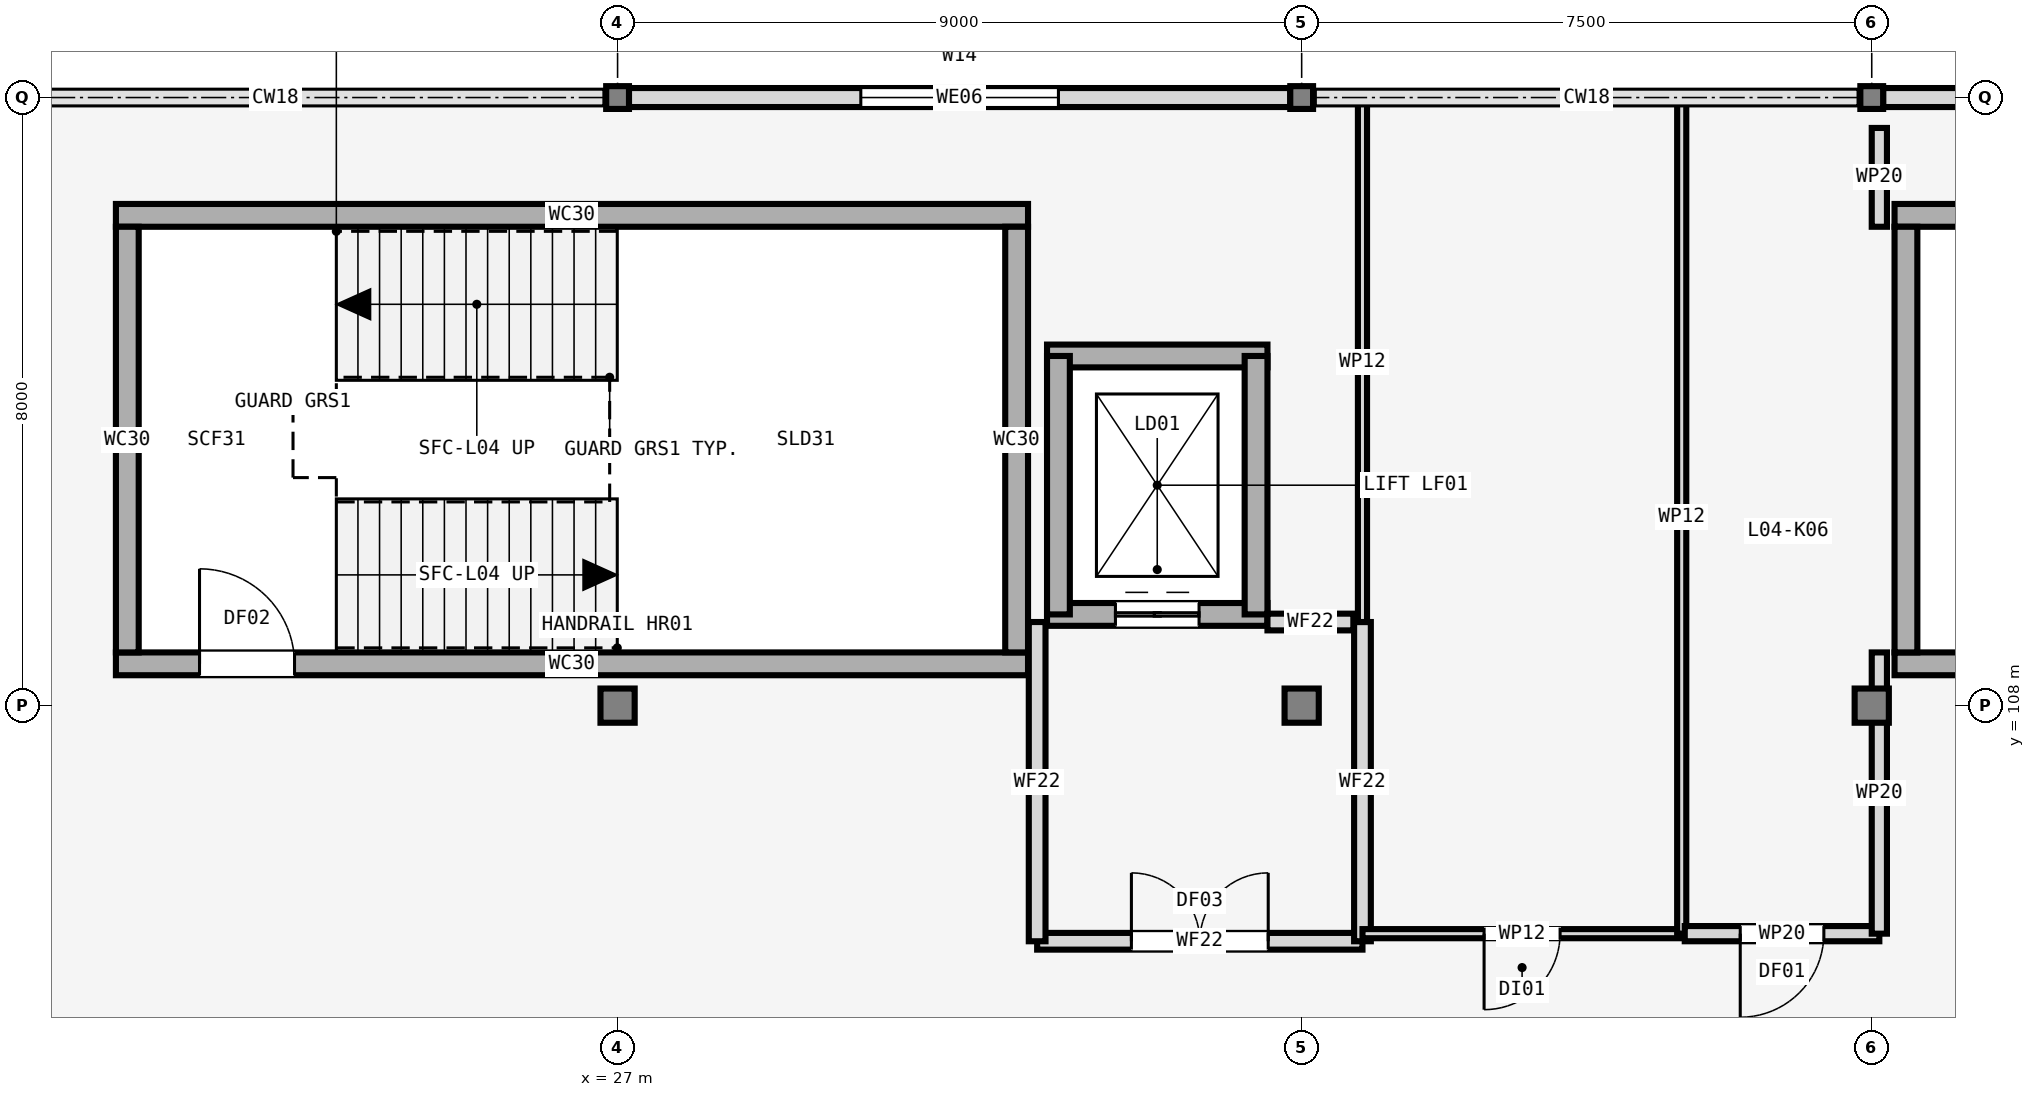
"""IFC4 building model, lengths in metres.
Left out: names, types, materials, properties, quantities, classifications, styles, units other than length and angle.
Written with IfcOpenShell. Run it as: python <this file> out.ifc"""

import sys

from ifc_helpers import new_model, si_unit, direction, frame, frame_2d, origin, origin_2d, place, context, subcontext, project, spatial, rectangle, i_section, extrude, element, fill, save


model = new_model("IFC4")
c1 = context("Model", 3, precision=1e-05, world=origin(), true_north=direction((0.0, 1.0)))
c2 = subcontext(c1, "Body", "Model", "MODEL_VIEW")
j1 = project(units=[si_unit("LENGTHUNIT", "METRE"), si_unit("PLANEANGLEUNIT", "RADIAN")], contexts=[c1])
p1 = place(None, origin())
s1 = spatial("IfcSite", under=j1, at=p1, CompositionType="ELEMENT")
p2 = place(p1, origin())
s2 = spatial("IfcBuilding", under=s1, at=p2, CompositionType="ELEMENT")
p3 = place(p2, frame((0.0, 0.0, 17.7)))
s3 = spatial("IfcBuildingStorey", under=s2, at=p3, CompositionType="ELEMENT", Elevation=17.7)
p4 = place(p3, frame((27.0, 108.0, 0.0), z_axis=(0.0, 0.0, 1.0), x_axis=(1.0, 0.0, 0.0)))
e1 = element("IfcColumn", 1, at=p4, inside=s3, PredefinedType="COLUMN", context=c2, shape_type="SweptSolid", body=[
    extrude(rectangle(XDim=0.45, YDim=0.45, at=origin_2d()), origin(), (0.0, 0.0, 1.0), 3.96),
])
p5 = place(p3, frame((27.0, 116.0, 0.0), z_axis=(0.0, 0.0, 1.0), x_axis=(1.0, 0.0, 0.0)))
e2 = element("IfcColumn", 2, at=p5, inside=s3, PredefinedType="COLUMN", context=c2, shape_type="SweptSolid", body=[
    extrude(i_section(OverallWidth=0.3, OverallDepth=0.3, WebThickness=0.011, FlangeThickness=0.019, at=origin_2d()), origin(), (0.0, 0.0, 1.0), 3.96),
])
p6 = place(p3, frame((36.0, 108.0, 0.0), z_axis=(0.0, 0.0, 1.0), x_axis=(1.0, 0.0, 0.0)))
e3 = element("IfcColumn", 3, at=p6, inside=s3, PredefinedType="COLUMN", context=c2, shape_type="SweptSolid", body=[
    extrude(rectangle(XDim=0.45, YDim=0.45, at=origin_2d()), origin(), (0.0, 0.0, 1.0), 3.96),
])
p7 = place(p3, frame((36.0, 116.0, 0.0), z_axis=(0.0, 0.0, 1.0), x_axis=(1.0, 0.0, 0.0)))
e4 = element("IfcColumn", 4, at=p7, inside=s3, PredefinedType="COLUMN", context=c2, shape_type="SweptSolid", body=[
    extrude(i_section(OverallWidth=0.3, OverallDepth=0.3, WebThickness=0.011, FlangeThickness=0.019, at=origin_2d()), origin(), (0.0, 0.0, 1.0), 3.96),
])
p8 = place(p3, frame((43.5, 108.0, 0.0), z_axis=(0.0, 0.0, 1.0), x_axis=(1.0, 0.0, 0.0)))
e5 = element("IfcColumn", 5, at=p8, inside=s3, PredefinedType="COLUMN", context=c2, shape_type="SweptSolid", body=[
    extrude(rectangle(XDim=0.45, YDim=0.45, at=origin_2d()), origin(), (0.0, 0.0, 1.0), 3.96),
])
p9 = place(p3, frame((43.5, 116.0, 0.0), z_axis=(0.0, 0.0, 1.0), x_axis=(1.0, 0.0, 0.0)))
e6 = element("IfcColumn", 6, at=p9, inside=s3, PredefinedType="COLUMN", context=c2, shape_type="SweptSolid", body=[
    extrude(i_section(OverallWidth=0.3, OverallDepth=0.3, WebThickness=0.011, FlangeThickness=0.019, at=origin_2d()), origin(), (0.0, 0.0, 1.0), 3.96),
])
p10 = place(p3, frame((35.85, 116.0, 0.0), z_axis=(0.0, 0.0, 1.0), x_axis=(-1.0, 0.0, 0.0)))
e7 = element("IfcWall", 7, at=p10, inside=s3, PredefinedType="SOLIDWALL", context=c2, shape_type="SweptSolid", body=[
    extrude(rectangle(XDim=8.7, YDim=0.25, at=frame_2d((4.35, 0.0))), origin(), (0.0, 0.0, 1.0), 3.67),
])
p11 = place(p10, frame((3.05, 0.0, 0.95)))
e8 = element("IfcOpeningElement", 8, at=p11, cuts=e7, PredefinedType="OPENING", context=c2, shape_type="SweptSolid", body=[
    extrude(rectangle(XDim=2.6, YDim=1.75, at=frame_2d((1.3, 0.875))), frame((0.0, 0.135, 0.0), z_axis=(0.0, -1.0, 0.0), x_axis=(1.0, 0.0, 0.0)), (0.0, 0.0, 1.0), 0.27),
])
p12 = place(p3, frame((50.85, 116.0, 0.0), z_axis=(0.0, 0.0, 1.0), x_axis=(-1.0, 0.0, 0.0)))
e9 = element("IfcWall", 9, at=p12, inside=s3, PredefinedType="SOLIDWALL", context=c2, shape_type="SweptSolid", body=[
    extrude(rectangle(XDim=7.2, YDim=0.25, at=frame_2d((3.6, 0.0))), origin(), (0.0, 0.0, 1.0), 3.67),
])
p13 = place(p12, frame((2.625, 0.0, 0.95)))
e10 = element("IfcOpeningElement", 10, at=p13, cuts=e9, PredefinedType="OPENING", context=c2, shape_type="SweptSolid", body=[
    extrude(rectangle(XDim=1.95, YDim=1.65, at=frame_2d((0.975, 0.825))), frame((0.0, 0.135, 0.0), z_axis=(0.0, -1.0, 0.0), x_axis=(1.0, 0.0, 0.0)), (0.0, 0.0, 1.0), 0.27),
])
p14 = place(p3, frame((20.4, 108.55, 0.0), z_axis=(0.0, 0.0, 1.0), x_axis=(1.0, 0.0, 0.0)))
e11 = element("IfcWall", 11, at=p14, inside=s3, PredefinedType="SHEAR", context=c2, shape_type="SweptSolid", body=[
    extrude(rectangle(XDim=12.0, YDim=0.3, at=frame_2d((6.0, 0.0))), origin(), (0.0, 0.0, 1.0), 4.2),
])
p15 = place(p14, frame((1.1, 0.0, 0.0)))
e12 = element("IfcOpeningElement", 12, at=p15, cuts=e11, PredefinedType="OPENING", context=c2, shape_type="SweptSolid", body=[
    extrude(rectangle(XDim=1.25, YDim=2.15, at=frame_2d((0.625, 1.075))), frame((0.0, 0.16, 0.0), z_axis=(0.0, -1.0, 0.0), x_axis=(1.0, 0.0, 0.0)), (0.0, 0.0, 1.0), 0.32),
])
p16 = place(p3, frame((32.4, 114.45, 0.0), z_axis=(0.0, 0.0, 1.0), x_axis=(-1.0, 0.0, 0.0)))
e13 = element("IfcWall", 13, at=p16, inside=s3, PredefinedType="SHEAR", context=c2, shape_type="SweptSolid", body=[
    extrude(rectangle(XDim=12.0, YDim=0.3, at=frame_2d((6.0, 0.0))), origin(), (0.0, 0.0, 1.0), 4.2),
])
for number, where, z_axis, x_axis in (
    (14, (20.55, 114.3, 0.0), (0.0, 0.0, 1.0), (0.0, -1.0, 0.0)),
    (15, (32.25, 108.7, 0.0), (0.0, 0.0, 1.0), (0.0, 1.0, 0.0)),
):
    element("IfcWall", number, at=place(p3, frame(where, z_axis=z_axis, x_axis=x_axis)), inside=s3, PredefinedType="SHEAR", context=c2, shape_type="SweptSolid", body=[
        extrude(rectangle(XDim=5.6, YDim=0.3, at=frame_2d((2.8, 0.0))), origin(), (0.0, 0.0, 1.0), 4.2),
    ])
p17 = place(p3, frame((43.8, 108.55, 0.0), z_axis=(0.0, 0.0, 1.0), x_axis=(1.0, 0.0, 0.0)))
e16 = element("IfcWall", 16, at=p17, inside=s3, PredefinedType="SHEAR", context=c2, shape_type="SweptSolid", body=[
    extrude(rectangle(XDim=12.0, YDim=0.3, at=frame_2d((6.0, 0.0))), origin(), (0.0, 0.0, 1.0), 4.2),
])
p18 = place(p17, frame((1.1, 0.0, 0.0)))
e17 = element("IfcOpeningElement", 17, at=p18, cuts=e16, PredefinedType="OPENING", context=c2, shape_type="SweptSolid", body=[
    extrude(rectangle(XDim=1.25, YDim=2.15, at=frame_2d((0.625, 1.075))), frame((0.0, 0.16, 0.0), z_axis=(0.0, -1.0, 0.0), x_axis=(1.0, 0.0, 0.0)), (0.0, 0.0, 1.0), 0.32),
])
p19 = place(p3, frame((55.8, 114.45, 0.0), z_axis=(0.0, 0.0, 1.0), x_axis=(-1.0, 0.0, 0.0)))
e18 = element("IfcWall", 18, at=p19, inside=s3, PredefinedType="SHEAR", context=c2, shape_type="SweptSolid", body=[
    extrude(rectangle(XDim=12.0, YDim=0.3, at=frame_2d((6.0, 0.0))), origin(), (0.0, 0.0, 1.0), 4.2),
])
p20 = place(p3, frame((43.95, 114.3, 0.0), z_axis=(0.0, 0.0, 1.0), x_axis=(0.0, -1.0, 0.0)))
e19 = element("IfcWall", 19, at=p20, inside=s3, PredefinedType="SHEAR", context=c2, shape_type="SweptSolid", body=[
    extrude(rectangle(XDim=5.6, YDim=0.3, at=frame_2d((2.8, 0.0))), origin(), (0.0, 0.0, 1.0), 4.2),
])
p21 = place(p3, frame((32.65, 109.2, 0.0), z_axis=(0.0, 0.0, 1.0), x_axis=(1.0, 0.0, 0.0)))
e20 = element("IfcWall", 20, at=p21, inside=s3, PredefinedType="SHEAR", context=c2, shape_type="SweptSolid", body=[
    extrude(rectangle(XDim=2.9, YDim=0.3, at=frame_2d((1.45, 0.0))), origin(), (0.0, 0.0, 1.0), 4.2),
])
p22 = place(p21, frame((0.9, 0.0, 0.0)))
e21 = element("IfcOpeningElement", 21, at=p22, cuts=e20, PredefinedType="OPENING", context=c2, shape_type="SweptSolid", body=[
    extrude(rectangle(XDim=1.1, YDim=2.15, at=frame_2d((0.55, 1.075))), frame((0.0, 0.16, 0.0), z_axis=(0.0, -1.0, 0.0), x_axis=(1.0, 0.0, 0.0)), (0.0, 0.0, 1.0), 0.32),
])
p23 = place(p3, frame((35.55, 112.6, 0.0), z_axis=(0.0, 0.0, 1.0), x_axis=(-1.0, 0.0, 0.0)))
e22 = element("IfcWall", 22, at=p23, inside=s3, PredefinedType="SHEAR", context=c2, shape_type="SweptSolid", body=[
    extrude(rectangle(XDim=2.9, YDim=0.3, at=frame_2d((1.45, 0.0))), origin(), (0.0, 0.0, 1.0), 4.2),
])
for number, where, z_axis, x_axis in (
    (23, (32.8, 112.6, 0.0), (0.0, 0.0, 1.0), (0.0, -1.0, 0.0)),
    (24, (35.4, 109.2, 0.0), (0.0, 0.0, 1.0), (0.0, 1.0, 0.0)),
):
    element("IfcWall", number, at=place(p3, frame(where, z_axis=z_axis, x_axis=x_axis)), inside=s3, PredefinedType="SHEAR", context=c2, shape_type="SweptSolid", body=[
        extrude(rectangle(XDim=3.4, YDim=0.3, at=frame_2d((1.7, 0.0))), origin(), (0.0, 0.0, 1.0), 4.2),
    ])
p24 = place(p3, frame((32.52, 104.9, 0.0), z_axis=(0.0, 0.0, 1.0), x_axis=(1.0, 0.0, 0.0)))
e25 = element("IfcWall", 25, at=p24, inside=s3, PredefinedType="SOLIDWALL", context=c2, shape_type="SweptSolid", body=[
    extrude(rectangle(XDim=4.28, YDim=0.22, at=frame_2d((2.14, 0.0))), origin(), (0.0, 0.0, 1.0), 3.15),
])
p25 = place(p24, frame((1.24, 0.0, 0.0)))
e26 = element("IfcOpeningElement", 26, at=p25, cuts=e25, PredefinedType="OPENING", context=c2, shape_type="SweptSolid", body=[
    extrude(rectangle(XDim=1.8, YDim=2.2, at=frame_2d((0.9, 1.1))), frame((0.0, 0.12, 0.0), z_axis=(0.0, -1.0, 0.0), x_axis=(1.0, 0.0, 0.0)), (0.0, 0.0, 1.0), 0.24),
])
for number, where, z_axis, x_axis in (
    (27, (32.52, 104.9, 0.0), (0.0, 0.0, 1.0), (0.0, 1.0, 0.0)),
    (28, (36.8, 104.9, 0.0), (0.0, 0.0, 1.0), (0.0, 1.0, 0.0)),
):
    element("IfcWall", number, at=place(p3, frame(where, z_axis=z_axis, x_axis=x_axis)), inside=s3, PredefinedType="SOLIDWALL", context=c2, shape_type="SweptSolid", body=[
        extrude(rectangle(XDim=4.2, YDim=0.22, at=frame_2d((2.1, 0.0))), origin(), (0.0, 0.0, 1.0), 3.15),
    ])
p26 = place(p3, frame((35.55, 109.1, 0.0), z_axis=(0.0, 0.0, 1.0), x_axis=(1.0, 0.0, 0.0)))
e29 = element("IfcWall", 29, at=p26, inside=s3, PredefinedType="SOLIDWALL", context=c2, shape_type="SweptSolid", body=[
    extrude(rectangle(XDim=1.13, YDim=0.22, at=frame_2d((0.565, 0.0))), origin(), (0.0, 0.0, 1.0), 3.15),
])
p27 = place(p3, frame((41.0, 105.0, 0.0), z_axis=(0.0, 0.0, 1.0), x_axis=(-1.0, 0.0, 0.0)))
e30 = element("IfcWall", 30, at=p27, inside=s3, PredefinedType="PARTITIONING", context=c2, shape_type="SweptSolid", body=[
    extrude(rectangle(XDim=4.2, YDim=0.12, at=frame_2d((2.1, 0.0))), origin(), (0.0, 0.0, 1.0), 3.15),
])
p28 = place(p27, frame((1.6, 0.0, 0.0)))
e31 = element("IfcOpeningElement", 31, at=p28, cuts=e30, PredefinedType="OPENING", context=c2, shape_type="SweptSolid", body=[
    extrude(rectangle(XDim=1.0, YDim=2.1, at=frame_2d((0.5, 1.05))), frame((0.0, 0.07, 0.0), z_axis=(0.0, -1.0, 0.0), x_axis=(1.0, 0.0, 0.0)), (0.0, 0.0, 1.0), 0.14),
])
p29 = place(p3, frame((41.0, 115.952, 0.0), z_axis=(0.0, 0.0, 1.0), x_axis=(0.0, -1.0, 0.0)))
e32 = element("IfcWall", 32, at=p29, inside=s3, PredefinedType="PARTITIONING", context=c2, shape_type="SweptSolid", body=[
    extrude(rectangle(XDim=10.952, YDim=0.12, at=frame_2d((5.476, 0.0))), origin(), (0.0, 0.0, 1.0), 3.15),
])
p30 = place(p3, frame((36.8, 109.1, 0.0), z_axis=(0.0, 0.0, 1.0), x_axis=(0.0, 1.0, 0.0)))
e33 = element("IfcWall", 33, at=p30, inside=s3, PredefinedType="PARTITIONING", context=c2, shape_type="SweptSolid", body=[
    extrude(rectangle(XDim=6.852, YDim=0.12, at=frame_2d((3.426, 0.0))), origin(), (0.0, 0.0, 1.0), 3.15),
])
p31 = place(p3, frame((43.6, 105.0, 0.0), z_axis=(0.0, 0.0, 1.0), x_axis=(-1.0, 0.0, 0.0)))
e34 = element("IfcWall", 34, at=p31, inside=s3, PredefinedType="PARTITIONING", context=c2, shape_type="SweptSolid", body=[
    extrude(rectangle(XDim=2.56, YDim=0.2, at=frame_2d((1.28, 0.0))), origin(), (0.0, 0.0, 1.0), 3.15),
])
p32 = place(p31, frame((0.73, 0.0, 0.0)))
e35 = element("IfcOpeningElement", 35, at=p32, cuts=e34, PredefinedType="OPENING", context=c2, shape_type="SweptSolid", body=[
    extrude(rectangle(XDim=1.1, YDim=2.15, at=frame_2d((0.55, 1.075))), frame((0.0, 0.11, 0.0), z_axis=(0.0, -1.0, 0.0), x_axis=(1.0, 0.0, 0.0)), (0.0, 0.0, 1.0), 0.22),
])
p33 = place(p3, frame((43.6, 108.7, 0.0), z_axis=(0.0, 0.0, 1.0), x_axis=(0.0, -1.0, 0.0)))
e36 = element("IfcWall", 36, at=p33, inside=s3, PredefinedType="PARTITIONING", context=c2, shape_type="SweptSolid", body=[
    extrude(rectangle(XDim=3.7, YDim=0.2, at=frame_2d((1.85, 0.0))), origin(), (0.0, 0.0, 1.0), 3.15),
])
p34 = place(p3, frame((43.6, 115.6, 0.0), z_axis=(0.0, 0.0, 1.0), x_axis=(0.0, -1.0, 0.0)))
e37 = element("IfcWall", 37, at=p34, inside=s3, PredefinedType="PARTITIONING", context=c2, shape_type="SweptSolid", body=[
    extrude(rectangle(XDim=1.3, YDim=0.2, at=frame_2d((0.65, 0.0))), origin(), (0.0, 0.0, 1.0), 3.15),
])
p35 = place(p11, origin())
e38 = element("IfcWindow", 38, at=p35, inside=s3, PartitioningType="SINGLE_PANEL", PredefinedType="WINDOW", context=c2, shape_type="SweptSolid", body=[
    extrude(rectangle(XDim=2.6, YDim=1.75, at=frame_2d((1.3, 0.875))), frame((0.0, 0.03, 0.0), z_axis=(0.0, -1.0, 0.0), x_axis=(1.0, 0.0, 0.0)), (0.0, 0.0, 1.0), 0.06),
])
fill(e8, e38)
p36 = place(p15, origin())
e39 = element("IfcDoor", 39, at=p36, inside=s3, OperationType="SINGLE_SWING_LEFT", PredefinedType="DOOR", context=c2, shape_type="SweptSolid", body=[
    extrude(rectangle(XDim=1.25, YDim=2.15, at=frame_2d((0.625, 1.075))), frame((0.0, 0.025, 0.0), z_axis=(0.0, -1.0, 0.0), x_axis=(1.0, 0.0, 0.0)), (0.0, 0.0, 1.0), 0.05),
])
fill(e12, e39)
p37 = place(p22, origin())
e40 = element("IfcDoor", 40, at=p37, inside=s3, OperationType="DOUBLE_DOOR_SLIDING", PredefinedType="DOOR", context=c2, shape_type="SweptSolid", body=[
    extrude(rectangle(XDim=1.1, YDim=2.15, at=frame_2d((0.55, 1.075))), frame((0.0, 0.025, 0.0), z_axis=(0.0, -1.0, 0.0), x_axis=(1.0, 0.0, 0.0)), (0.0, 0.0, 1.0), 0.05),
])
fill(e21, e40)
p38 = place(p25, origin())
e41 = element("IfcDoor", 41, at=p38, inside=s3, OperationType="DOUBLE_DOOR_SINGLE_SWING", PredefinedType="DOOR", context=c2, shape_type="SweptSolid", body=[
    extrude(rectangle(XDim=1.8, YDim=2.2, at=frame_2d((0.9, 1.1))), frame((0.0, 0.025, 0.0), z_axis=(0.0, -1.0, 0.0), x_axis=(1.0, 0.0, 0.0)), (0.0, 0.0, 1.0), 0.05),
])
fill(e26, e41)
p39 = place(p28, origin())
e42 = element("IfcDoor", 42, at=p39, inside=s3, OperationType="SINGLE_SWING_RIGHT", PredefinedType="DOOR", context=c2, shape_type="SweptSolid", body=[
    extrude(rectangle(XDim=1.0, YDim=2.1, at=frame_2d((0.5, 1.05))), frame((0.0, 0.025, 0.0), z_axis=(0.0, -1.0, 0.0), x_axis=(1.0, 0.0, 0.0)), (0.0, 0.0, 1.0), 0.05),
])
fill(e31, e42)
p40 = place(p32, origin())
e43 = element("IfcDoor", 43, at=p40, inside=s3, OperationType="SINGLE_SWING_RIGHT", PredefinedType="DOOR", context=c2, shape_type="SweptSolid", body=[
    extrude(rectangle(XDim=1.1, YDim=2.15, at=frame_2d((0.55, 1.075))), frame((0.0, 0.025, 0.0), z_axis=(0.0, -1.0, 0.0), x_axis=(1.0, 0.0, 0.0)), (0.0, 0.0, 1.0), 0.05),
])
fill(e35, e43)
save(model, sys.argv[1])
